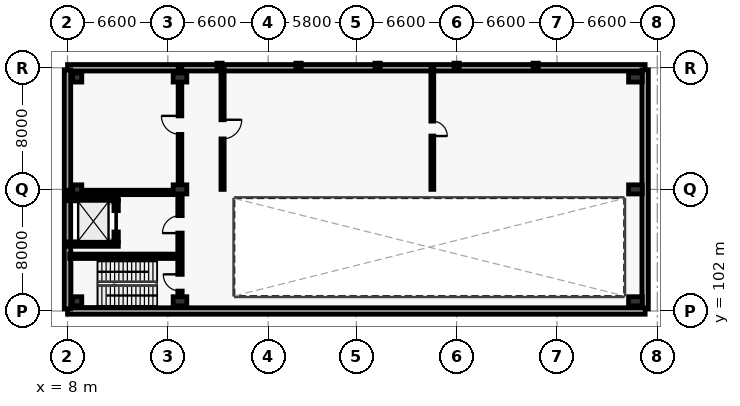
"""IFC4 building model, lengths in metres.
Left out: names, types, materials, properties, quantities, classifications, styles, units other than length and angle.
Written with IfcOpenShell. Run it as: python <this file> out.ifc"""

import sys

from ifc_helpers import new_model, si_unit, direction, frame, frame_2d, origin, origin_2d, place, context, subcontext, project, spatial, rectangle, extrude, element, fill, save


model = new_model("IFC4")
c1 = context("Model", 3, precision=1e-05, world=origin(), true_north=direction((0.0, 1.0)))
c2 = subcontext(c1, "Body", "Model", "MODEL_VIEW")
j1 = project(units=[si_unit("LENGTHUNIT", "METRE"), si_unit("PLANEANGLEUNIT", "RADIAN")], contexts=[c1])
p1 = place(None, origin())
s1 = spatial("IfcSite", under=j1, at=p1, CompositionType="ELEMENT")
p2 = place(p1, origin())
s2 = spatial("IfcBuilding", under=s1, at=p2, CompositionType="ELEMENT")
p3 = place(p2, frame((0.0, 0.0, 10.2)))
s3 = spatial("IfcBuildingStorey", under=s2, at=p3, CompositionType="ELEMENT", Elevation=10.2)
for number, where, z_axis, x_axis in (
    (1, (8.64, 102.64, 0.0), (0.0, 0.0, 1.0), (1.0, 0.0, 0.0)),
    (2, (8.64, 110.0, 0.0), (0.0, 0.0, 1.0), (1.0, 0.0, 0.0)),
    (3, (8.64, 117.36, 0.0), (0.0, 0.0, 1.0), (1.0, 0.0, 0.0)),
):
    element("IfcColumn", number, at=place(p3, frame(where, z_axis=z_axis, x_axis=x_axis)), inside=s3, PredefinedType="COLUMN", context=c2, shape_type="SweptSolid", body=[
        extrude(rectangle(XDim=0.6, YDim=0.6, at=origin_2d()), origin(), (0.0, 0.0, 1.0), 5.4),
    ])
for number, where, z_axis, x_axis in (
    (4, (15.4, 102.64, 0.0), (0.0, 0.0, 1.0), (1.0, 0.0, 0.0)),
    (5, (15.4, 110.0, 0.0), (0.0, 0.0, 1.0), (1.0, 0.0, 0.0)),
    (6, (15.4, 117.36, 0.0), (0.0, 0.0, 1.0), (1.0, 0.0, 0.0)),
    (7, (45.36, 102.64, 0.0), (0.0, 0.0, 1.0), (1.0, 0.0, 0.0)),
    (8, (45.36, 110.0, 0.0), (0.0, 0.0, 1.0), (1.0, 0.0, 0.0)),
    (9, (45.36, 117.36, 0.0), (0.0, 0.0, 1.0), (1.0, 0.0, 0.0)),
):
    element("IfcColumn", number, at=place(p3, frame(where, z_axis=z_axis, x_axis=x_axis)), inside=s3, PredefinedType="COLUMN", context=c2, shape_type="SweptSolid", body=[
        extrude(rectangle(XDim=0.6, YDim=0.9, at=origin_2d()), origin(), (0.0, 0.0, 1.0), 5.4),
    ])
for number, where, z_axis, x_axis in (
    (10, (18.0, 118.08, 0.0), (0.0, 0.0, 1.0), (0.0, 1.0, 0.0)),
    (11, (23.2, 118.08, 0.0), (0.0, 0.0, 1.0), (0.0, 1.0, 0.0)),
    (12, (28.4, 118.08, 0.0), (0.0, 0.0, 1.0), (0.0, 1.0, 0.0)),
    (13, (33.6, 118.08, 0.0), (0.0, 0.0, 1.0), (0.0, 1.0, 0.0)),
    (14, (38.8, 118.08, 0.0), (0.0, 0.0, 1.0), (0.0, 1.0, 0.0)),
):
    element("IfcColumn", number, at=place(p3, frame(where, z_axis=z_axis, x_axis=x_axis)), inside=s3, PredefinedType="PILASTER", context=c2, shape_type="SweptSolid", body=[
        extrude(rectangle(XDim=0.35, YDim=0.45, at=origin_2d()), origin(), (0.0, 0.0, 1.0), 5.4),
    ])
p4 = place(p3, frame((8.0, 118.0, 0.0), z_axis=(0.0, 0.0, 1.0), x_axis=(1.0, 0.0, 0.0)))
e15 = element("IfcWall", 15, at=p4, inside=s3, PredefinedType="SOLIDWALL", context=c2, shape_type="SweptSolid", body=[
    extrude(rectangle(XDim=38.0, YDim=0.425, at=frame_2d((19.0, 0.0))), origin(), (0.0, 0.0, 1.0), 5.16),
])
p5 = place(p3, frame((46.0, 117.86, 0.0), z_axis=(0.0, 0.0, 1.0), x_axis=(0.0, -1.0, 0.0)))
e16 = element("IfcWall", 16, at=p5, inside=s3, PredefinedType="SOLIDWALL", context=c2, shape_type="SweptSolid", body=[
    extrude(rectangle(XDim=15.72, YDim=0.425, at=frame_2d((7.86, 0.0))), origin(), (0.0, 0.0, 1.0), 5.16),
])
p6 = place(p3, frame((46.0, 102.0, 0.0), z_axis=(0.0, 0.0, 1.0), x_axis=(-1.0, 0.0, 0.0)))
e17 = element("IfcWall", 17, at=p6, inside=s3, PredefinedType="SOLIDWALL", context=c2, shape_type="SweptSolid", body=[
    extrude(rectangle(XDim=38.0, YDim=0.425, at=frame_2d((19.0, 0.0))), origin(), (0.0, 0.0, 1.0), 5.16),
])
p7 = place(p3, frame((8.0, 102.14, 0.0), z_axis=(0.0, 0.0, 1.0), x_axis=(0.0, 1.0, 0.0)))
e18 = element("IfcWall", 18, at=p7, inside=s3, PredefinedType="SOLIDWALL", context=c2, shape_type="SweptSolid", body=[
    extrude(rectangle(XDim=15.72, YDim=0.425, at=frame_2d((7.86, 0.0))), origin(), (0.0, 0.0, 1.0), 5.16),
])
p8 = place(p3, frame((7.855, 109.8, 0.0), z_axis=(0.0, 0.0, 1.0), x_axis=(1.0, 0.0, 0.0)))
e19 = element("IfcWall", 19, at=p8, inside=s3, PredefinedType="SHEAR", context=c2, shape_type="SweptSolid", body=[
    extrude(rectangle(XDim=7.243, YDim=0.29, at=frame_2d((3.622, 0.0))), origin(), (0.0, 0.0, 1.0), 5.16),
])
p9 = place(p3, frame((15.4, 103.092, 0.0), z_axis=(0.0, 0.0, 1.0), x_axis=(0.0, 1.0, 0.0)))
e20 = element("IfcWall", 20, at=p9, inside=s3, PredefinedType="SHEAR", context=c2, shape_type="SweptSolid", body=[
    extrude(rectangle(XDim=6.456, YDim=0.29, at=frame_2d((3.228, 0.0))), origin(), (0.0, 0.0, 1.0), 5.16),
])
p10 = place(p9, frame((0.22, 0.0, 0.0)))
e21 = element("IfcOpeningElement", 21, at=p10, cuts=e20, PredefinedType="OPENING", context=c2, shape_type="SweptSolid", body=[
    extrude(rectangle(XDim=1.1, YDim=2.15, at=frame_2d((0.55, 1.075))), frame((0.0, 0.155, 0.0), z_axis=(0.0, -1.0, 0.0), x_axis=(1.0, 0.0, 0.0)), (0.0, 0.0, 1.0), 0.31),
])
p11 = place(p9, frame((4.033, 0.0, 0.0)))
e22 = element("IfcOpeningElement", 22, at=p11, cuts=e20, PredefinedType="OPENING", context=c2, shape_type="SweptSolid", body=[
    extrude(rectangle(XDim=1.15, YDim=2.2, at=frame_2d((0.575, 1.1))), frame((0.0, 0.155, 0.0), z_axis=(0.0, -1.0, 0.0), x_axis=(1.0, 0.0, 0.0)), (0.0, 0.0, 1.0), 0.31),
])
p12 = place(p3, frame((8.145, 105.6, 0.0), z_axis=(0.0, 0.0, 1.0), x_axis=(1.0, 0.0, 0.0)))
e23 = element("IfcWall", 23, at=p12, inside=s3, PredefinedType="SHEAR", context=c2, shape_type="SweptSolid", body=[
    extrude(rectangle(XDim=7.11, YDim=0.29, at=frame_2d((3.555, 0.0))), origin(), (0.0, 0.0, 1.0), 5.16),
])
for number, where, z_axis, x_axis in (
    (24, (8.055, 106.4, 0.0), (0.0, 0.0, 1.0), (1.0, 0.0, 0.0)),
    (25, (8.055, 109.4, 0.0), (0.0, 0.0, 1.0), (1.0, 0.0, 0.0)),
):
    element("IfcWall", number, at=place(p3, frame(where, z_axis=z_axis, x_axis=x_axis)), inside=s3, PredefinedType="SHEAR", context=c2, shape_type="SweptSolid", body=[
        extrude(rectangle(XDim=3.29, YDim=0.29, at=frame_2d((1.645, 0.0))), origin(), (0.0, 0.0, 1.0), 5.16),
    ])
p13 = place(p3, frame((11.2, 106.545, 0.0), z_axis=(0.0, 0.0, 1.0), x_axis=(0.0, 1.0, 0.0)))
e26 = element("IfcWall", 26, at=p13, inside=s3, PredefinedType="SHEAR", context=c2, shape_type="SweptSolid", body=[
    extrude(rectangle(XDim=2.71, YDim=0.29, at=frame_2d((1.355, 0.0))), origin(), (0.0, 0.0, 1.0), 5.16),
])
p14 = place(p13, frame((0.655, 0.0, 0.0)))
e27 = element("IfcOpeningElement", 27, at=p14, cuts=e26, PredefinedType="OPENING", context=c2, shape_type="SweptSolid", body=[
    extrude(rectangle(XDim=1.4, YDim=2.25, at=frame_2d((0.7, 1.125))), frame((0.0, 0.155, 0.0), z_axis=(0.0, -1.0, 0.0), x_axis=(1.0, 0.0, 0.0)), (0.0, 0.0, 1.0), 0.31),
])
p15 = place(p3, frame((15.4, 110.452, 0.0), z_axis=(0.0, 0.0, 1.0), x_axis=(0.0, 1.0, 0.0)))
e28 = element("IfcWall", 28, at=p15, inside=s3, PredefinedType="PARTITIONING", context=c2, shape_type="SweptSolid", body=[
    extrude(rectangle(XDim=7.548, YDim=0.24, at=frame_2d((3.774, 0.0))), origin(), (0.0, 0.0, 1.0), 4.41),
])
p16 = place(p15, frame((3.164, 0.0, 0.0)))
e29 = element("IfcOpeningElement", 29, at=p16, cuts=e28, PredefinedType="OPENING", context=c2, shape_type="SweptSolid", body=[
    extrude(rectangle(XDim=1.22, YDim=2.2, at=frame_2d((0.61, 1.1))), frame((0.0, 0.13, 0.0), z_axis=(0.0, -1.0, 0.0), x_axis=(1.0, 0.0, 0.0)), (0.0, 0.0, 1.0), 0.26),
])
p17 = place(p3, frame((18.2, 117.903, 0.0), z_axis=(0.0, 0.0, 1.0), x_axis=(0.0, -1.0, 0.0)))
e30 = element("IfcWall", 30, at=p17, inside=s3, PredefinedType="PARTITIONING", context=c2, shape_type="SweptSolid", body=[
    extrude(rectangle(XDim=7.903, YDim=0.21, at=frame_2d((3.952, 0.0))), origin(), (0.0, 0.0, 1.0), 5.16),
])
p18 = place(p17, frame((3.322, 0.0, 0.0)))
e31 = element("IfcOpeningElement", 31, at=p18, cuts=e30, PredefinedType="OPENING", context=c2, shape_type="SweptSolid", body=[
    extrude(rectangle(XDim=1.26, YDim=2.2, at=frame_2d((0.63, 1.1))), frame((0.0, 0.115, 0.0), z_axis=(0.0, -1.0, 0.0), x_axis=(1.0, 0.0, 0.0)), (0.0, 0.0, 1.0), 0.23),
])
p19 = place(p3, frame((32.0, 118.0, 0.0), z_axis=(0.0, 0.0, 1.0), x_axis=(0.0, -1.0, 0.0)))
e32 = element("IfcWall", 32, at=p19, inside=s3, PredefinedType="PARTITIONING", context=c2, shape_type="SweptSolid", body=[
    extrude(rectangle(XDim=8.0, YDim=0.19, at=frame_2d((4.0, 0.0))), origin(), (0.0, 0.0, 1.0), 5.16),
])
p20 = place(p19, frame((3.51, 0.0, 0.0)))
e33 = element("IfcOpeningElement", 33, at=p20, cuts=e32, PredefinedType="OPENING", context=c2, shape_type="SweptSolid", body=[
    extrude(rectangle(XDim=0.98, YDim=2.1, at=frame_2d((0.49, 1.05))), frame((0.0, 0.105, 0.0), z_axis=(0.0, -1.0, 0.0), x_axis=(1.0, 0.0, 0.0)), (0.0, 0.0, 1.0), 0.21),
])
p21 = place(p10, origin())
e34 = element("IfcDoor", 34, at=p21, inside=s3, OperationType="SINGLE_SWING_RIGHT", PredefinedType="DOOR", context=c2, shape_type="SweptSolid", body=[
    extrude(rectangle(XDim=1.1, YDim=2.15, at=frame_2d((0.55, 1.075))), frame((0.0, 0.025, 0.0), z_axis=(0.0, -1.0, 0.0), x_axis=(1.0, 0.0, 0.0)), (0.0, 0.0, 1.0), 0.05),
])
fill(e21, e34)
p22 = place(p11, origin())
e35 = element("IfcDoor", 35, at=p22, inside=s3, OperationType="SINGLE_SWING_LEFT", PredefinedType="DOOR", context=c2, shape_type="SweptSolid", body=[
    extrude(rectangle(XDim=1.15, YDim=2.2, at=frame_2d((0.575, 1.1))), frame((0.0, 0.025, 0.0), z_axis=(0.0, -1.0, 0.0), x_axis=(1.0, 0.0, 0.0)), (0.0, 0.0, 1.0), 0.05),
])
fill(e22, e35)
p23 = place(p14, origin())
e36 = element("IfcDoor", 36, at=p23, inside=s3, OperationType="SLIDING_TO_LEFT", PredefinedType="DOOR", context=c2, shape_type="SweptSolid", body=[
    extrude(rectangle(XDim=1.4, YDim=2.25, at=frame_2d((0.7, 1.125))), frame((0.0, 0.025, 0.0), z_axis=(0.0, -1.0, 0.0), x_axis=(1.0, 0.0, 0.0)), (0.0, 0.0, 1.0), 0.05),
])
fill(e27, e36)
p24 = place(p16, origin())
e37 = element("IfcDoor", 37, at=p24, inside=s3, OperationType="SINGLE_SWING_RIGHT", PredefinedType="DOOR", context=c2, shape_type="SweptSolid", body=[
    extrude(rectangle(XDim=1.22, YDim=2.2, at=frame_2d((0.61, 1.1))), frame((0.0, 0.025, 0.0), z_axis=(0.0, -1.0, 0.0), x_axis=(1.0, 0.0, 0.0)), (0.0, 0.0, 1.0), 0.05),
])
fill(e29, e37)
p25 = place(p18, origin())
e38 = element("IfcDoor", 38, at=p25, inside=s3, OperationType="SINGLE_SWING_LEFT", PredefinedType="DOOR", context=c2, shape_type="SweptSolid", body=[
    extrude(rectangle(XDim=1.26, YDim=2.2, at=frame_2d((0.63, 1.1))), frame((0.0, 0.025, 0.0), z_axis=(0.0, -1.0, 0.0), x_axis=(1.0, 0.0, 0.0)), (0.0, 0.0, 1.0), 0.05),
])
fill(e31, e38)
p26 = place(p20, origin())
e39 = element("IfcDoor", 39, at=p26, inside=s3, OperationType="SINGLE_SWING_RIGHT", PredefinedType="DOOR", context=c2, shape_type="SweptSolid", body=[
    extrude(rectangle(XDim=0.98, YDim=2.1, at=frame_2d((0.49, 1.05))), frame((0.0, 0.025, 0.0), z_axis=(0.0, -1.0, 0.0), x_axis=(1.0, 0.0, 0.0)), (0.0, 0.0, 1.0), 0.05),
])
fill(e33, e39)
save(model, sys.argv[1])
